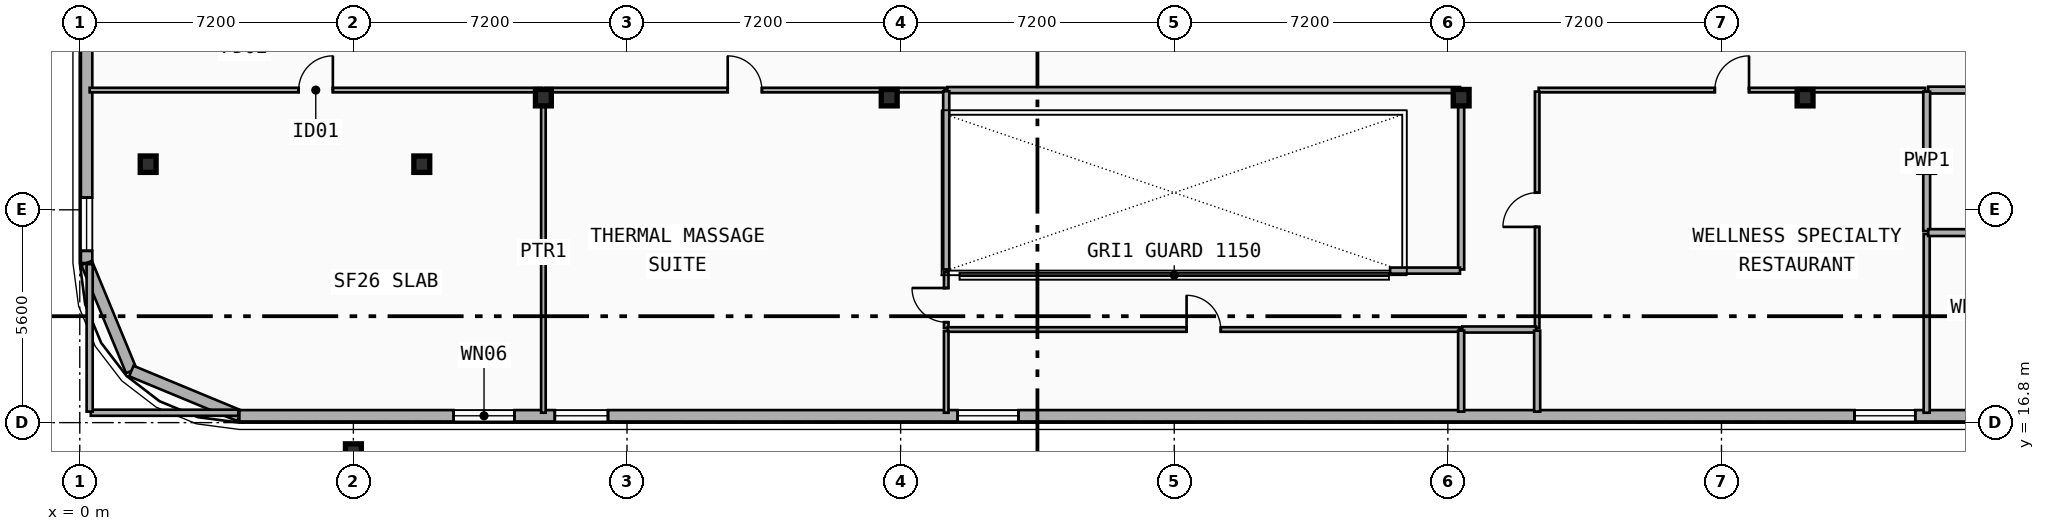
"""IFC4 building model, lengths in metres.
Left out: names, types, materials, properties, quantities, classifications, styles, units other than length and angle.
Written with IfcOpenShell. Run it as: python <this file> out.ifc"""

import sys

from ifc_helpers import new_model, si_unit, direction, frame, frame_2d, origin, origin_2d, place, context, subcontext, project, spatial, rectangle, i_section, extrude, element, fill, save


model = new_model("IFC4")
c1 = context("Model", 3, precision=1e-05, world=origin(), true_north=direction((0.0, 1.0)))
c2 = subcontext(c1, "Body", "Model", "MODEL_VIEW")
j1 = project(units=[si_unit("LENGTHUNIT", "METRE"), si_unit("PLANEANGLEUNIT", "RADIAN")], contexts=[c1])
p1 = place(None, origin())
s1 = spatial("IfcSite", under=j1, at=p1, CompositionType="ELEMENT")
p2 = place(p1, origin())
s2 = spatial("IfcBuilding", under=s1, at=p2, CompositionType="ELEMENT")
p3 = place(p2, frame((0.0, 0.0, 122.3)))
s3 = spatial("IfcBuildingStorey", under=s2, at=p3, CompositionType="ELEMENT", Elevation=122.3)
for number, where, z_axis, x_axis in (
    (1, (12.2, 25.35, 0.0), (0.0, 0.0, 1.0), (1.0, 0.0, 0.0)),
    (2, (21.3, 25.35, 0.0), (0.0, 0.0, 1.0), (1.0, 0.0, 0.0)),
    (3, (36.35, 25.35, 0.0), (0.0, 0.0, 1.0), (1.0, 0.0, 0.0)),
    (4, (45.4, 25.35, 0.0), (0.0, 0.0, 1.0), (1.0, 0.0, 0.0)),
    (5, (9.0, 23.6, 0.0), (0.0, 0.0, 1.0), (1.0, 0.0, 0.0)),
    (6, (48.6, 23.6, 0.0), (0.0, 0.0, 1.0), (1.0, 0.0, 0.0)),
    (7, (1.8, 23.6, 0.0), (0.0, 0.0, 1.0), (1.0, 0.0, 0.0)),
):
    element("IfcColumn", number, at=place(p3, frame(where, z_axis=z_axis, x_axis=x_axis)), inside=s3, PredefinedType="COLUMN", context=c2, shape_type="SweptSolid", body=[
        extrude(i_section(OverallWidth=0.418, OverallDepth=0.432, WebThickness=0.035, FlangeThickness=0.056, FilletRadius=0.015, at=origin_2d()), origin(), (0.0, 0.0, 1.0), 3.5),
    ])
p4 = place(p3, frame((7.2, 16.122, 0.0), z_axis=(0.0, -0.079891690793, 0.996803550226), x_axis=(1.0, 0.0, 0.0)))
e8 = element("IfcColumn", 8, at=p4, inside=s3, PredefinedType="COLUMN", context=c2, shape_type="SweptSolid", body=[
    extrude(i_section(OverallWidth=0.418, OverallDepth=0.432, WebThickness=0.035, FlangeThickness=0.056, FilletRadius=0.015, at=origin_2d()), origin(), (0.0, 0.0, 1.0), 3.511),
])
p5 = place(p3, frame((0.18, 21.0, 0.0), z_axis=(0.0, 0.0, 1.0), x_axis=(0.0, 1.0, 0.0)))
e9 = element("IfcWall", 9, at=p5, inside=s3, PredefinedType="SOLIDWALL", context=c2, shape_type="SweptSolid", body=[
    extrude(rectangle(XDim=18.0, YDim=0.3, at=frame_2d((9.0, 0.0))), origin(), (0.0, 0.0, 1.0), 3.24),
])
p6 = place(p5, frame((7.47, 0.0, 0.48)))
e10 = element("IfcOpeningElement", 10, at=p6, cuts=e9, PredefinedType="OPENING", context=c2, shape_type="SweptSolid", body=[
    extrude(rectangle(XDim=1.4, YDim=1.8, at=frame_2d((0.7, 0.9))), frame((0.0, 0.16, 0.0), z_axis=(0.0, -1.0, 0.0), x_axis=(1.0, 0.0, 0.0)), (0.0, 0.0, 1.0), 0.32),
])
p7 = place(p5, frame((12.509, 0.0, 0.48)))
e11 = element("IfcOpeningElement", 11, at=p7, cuts=e9, PredefinedType="OPENING", context=c2, shape_type="SweptSolid", body=[
    extrude(rectangle(XDim=1.4, YDim=1.8, at=frame_2d((0.7, 0.9))), frame((0.0, 0.16, 0.0), z_axis=(0.0, -1.0, 0.0), x_axis=(1.0, 0.0, 0.0)), (0.0, 0.0, 1.0), 0.32),
])
p8 = place(p5, frame((0.32, 0.0, 0.65)))
e12 = element("IfcOpeningElement", 12, at=p8, cuts=e9, PredefinedType="OPENING", context=c2, shape_type="SweptSolid", body=[
    extrude(rectangle(XDim=1.4, YDim=1.8, at=frame_2d((0.7, 0.9))), frame((0.0, 0.16, 0.0), z_axis=(0.0, -1.0, 0.0), x_axis=(1.0, 0.0, 0.0)), (0.0, 0.0, 1.0), 0.32),
])
for number, where, z_axis, x_axis in (
    (13, (1.357, 18.157, 0.0), (0.0, 0.0, 1.0), (-0.383, 0.924, 0.0)),
    (14, (4.2, 16.98, 0.0), (0.0, 0.0, 1.0), (-0.924, 0.383, 0.0)),
):
    element("IfcWall", number, at=place(p3, frame(where, z_axis=z_axis, x_axis=x_axis)), inside=s3, PredefinedType="SOLIDWALL", context=c2, shape_type="SweptSolid", body=[
        extrude(rectangle(XDim=3.077, YDim=0.3, at=frame_2d((1.538, 0.0))), origin(), (0.0, 0.0, 1.0), 3.24),
    ])
p9 = place(p3, frame((53.4, 16.98, 0.0), z_axis=(0.0, 0.0, 1.0), x_axis=(-1.0, 0.0, 0.0)))
e15 = element("IfcWall", 15, at=p9, inside=s3, PredefinedType="SOLIDWALL", context=c2, shape_type="SweptSolid", body=[
    extrude(rectangle(XDim=49.2, YDim=0.3, at=frame_2d((24.6, 0.0))), origin(), (0.0, 0.0, 1.0), 3.24),
])
p10 = place(p9, frame((41.962, 0.0, 0.8)))
e16 = element("IfcOpeningElement", 16, at=p10, cuts=e15, PredefinedType="OPENING", context=c2, shape_type="SweptSolid", body=[
    extrude(rectangle(XDim=1.6, YDim=1.95, at=frame_2d((0.8, 0.975))), frame((0.0, 0.16, 0.0), z_axis=(0.0, -1.0, 0.0), x_axis=(1.0, 0.0, 0.0)), (0.0, 0.0, 1.0), 0.32),
])
p11 = place(p9, frame((39.5, 0.0, 0.34)))
e17 = element("IfcOpeningElement", 17, at=p11, cuts=e15, PredefinedType="OPENING", context=c2, shape_type="SweptSolid", body=[
    extrude(rectangle(XDim=1.4, YDim=1.8, at=frame_2d((0.7, 0.9))), frame((0.0, 0.16, 0.0), z_axis=(0.0, -1.0, 0.0), x_axis=(1.0, 0.0, 0.0)), (0.0, 0.0, 1.0), 0.32),
])
p12 = place(p9, frame((28.7, 0.0, 0.65)))
e18 = element("IfcOpeningElement", 18, at=p12, cuts=e15, PredefinedType="OPENING", context=c2, shape_type="SweptSolid", body=[
    extrude(rectangle(XDim=1.6, YDim=1.95, at=frame_2d((0.8, 0.975))), frame((0.0, 0.16, 0.0), z_axis=(0.0, -1.0, 0.0), x_axis=(1.0, 0.0, 0.0)), (0.0, 0.0, 1.0), 0.32),
])
p13 = place(p9, frame((5.1, 0.0, 0.8)))
e19 = element("IfcOpeningElement", 19, at=p13, cuts=e15, PredefinedType="OPENING", context=c2, shape_type="SweptSolid", body=[
    extrude(rectangle(XDim=1.6, YDim=1.95, at=frame_2d((0.8, 0.975))), frame((0.0, 0.16, 0.0), z_axis=(0.0, -1.0, 0.0), x_axis=(1.0, 0.0, 0.0)), (0.0, 0.0, 1.0), 0.32),
])
p14 = place(p3, frame((0.26, 25.55, 0.0), z_axis=(0.0, 0.0, 1.0), x_axis=(1.0, 0.0, 0.0)))
e20 = element("IfcWall", 20, at=p14, inside=s3, PredefinedType="PARTITIONING", context=c2, shape_type="SweptSolid", body=[
    extrude(rectangle(XDim=11.9, YDim=0.12, at=frame_2d((5.95, 0.0))), origin(), (0.0, 0.0, 1.0), 2.406),
])
p15 = place(p14, frame((5.5, 0.0, 0.0)))
e21 = element("IfcOpeningElement", 21, at=p15, cuts=e20, PredefinedType="OPENING", context=c2, shape_type="SweptSolid", body=[
    extrude(rectangle(XDim=0.9, YDim=2.1, at=frame_2d((0.45, 1.05))), frame((0.0, 0.07, 0.0), z_axis=(0.0, -1.0, 0.0), x_axis=(1.0, 0.0, 0.0)), (0.0, 0.0, 1.0), 0.14),
])
p16 = place(p3, frame((12.24, 25.55, 0.0), z_axis=(0.0, 0.0, 1.0), x_axis=(1.0, 0.0, 0.0)))
e22 = element("IfcWall", 22, at=p16, inside=s3, PredefinedType="PARTITIONING", context=c2, shape_type="SweptSolid", body=[
    extrude(rectangle(XDim=10.52, YDim=0.12, at=frame_2d((5.26, 0.0))), origin(), (0.0, 0.0, 1.0), 2.406),
])
p17 = place(p16, frame((4.81, 0.0, 0.0)))
e23 = element("IfcOpeningElement", 23, at=p17, cuts=e22, PredefinedType="OPENING", context=c2, shape_type="SweptSolid", body=[
    extrude(rectangle(XDim=0.9, YDim=2.1, at=frame_2d((0.45, 1.05))), frame((0.0, 0.07, 0.0), z_axis=(0.0, -1.0, 0.0), x_axis=(1.0, 0.0, 0.0)), (0.0, 0.0, 1.0), 0.14),
])
p18 = place(p3, frame((38.39, 25.55, 0.0), z_axis=(0.0, 0.0, 1.0), x_axis=(1.0, 0.0, 0.0)))
e24 = element("IfcWall", 24, at=p18, inside=s3, PredefinedType="PARTITIONING", context=c2, shape_type="SweptSolid", body=[
    extrude(rectangle(XDim=10.17, YDim=0.12, at=frame_2d((5.085, 0.0))), origin(), (0.0, 0.0, 1.0), 2.406),
])
p19 = place(p18, frame((4.635, 0.0, 0.0)))
e25 = element("IfcOpeningElement", 25, at=p19, cuts=e24, PredefinedType="OPENING", context=c2, shape_type="SweptSolid", body=[
    extrude(rectangle(XDim=0.9, YDim=2.1, at=frame_2d((0.45, 1.05))), frame((0.0, 0.07, 0.0), z_axis=(0.0, -1.0, 0.0), x_axis=(1.0, 0.0, 0.0)), (0.0, 0.0, 1.0), 0.14),
])
p20 = place(p3, frame((48.64, 25.55, 0.0), z_axis=(0.0, 0.0, 1.0), x_axis=(1.0, 0.0, 0.0)))
e26 = element("IfcWall", 26, at=p20, inside=s3, PredefinedType="PLUMBINGWALL", context=c2, shape_type="SweptSolid", body=[
    extrude(rectangle(XDim=8.7, YDim=0.18, at=frame_2d((4.35, 0.0))), origin(), (0.0, 0.0, 1.0), 2.57),
])
p21 = place(p20, frame((3.85, 0.0, 0.0)))
e27 = element("IfcOpeningElement", 27, at=p21, cuts=e26, PredefinedType="OPENING", context=c2, shape_type="SweptSolid", body=[
    extrude(rectangle(XDim=1.0, YDim=2.15, at=frame_2d((0.5, 1.075))), frame((0.0, 0.1, 0.0), z_axis=(0.0, -1.0, 0.0), x_axis=(1.0, 0.0, 0.0)), (0.0, 0.0, 1.0), 0.2),
])
p22 = place(p3, frame((38.35, 19.29, 0.0), z_axis=(0.0, 0.0, 1.0), x_axis=(0.0, 1.0, 0.0)))
e28 = element("IfcWall", 28, at=p22, inside=s3, PredefinedType="PARTITIONING", context=c2, shape_type="SweptSolid", body=[
    extrude(rectangle(XDim=6.22, YDim=0.12, at=frame_2d((3.11, 0.0))), origin(), (0.0, 0.0, 1.0), 2.72),
])
p23 = place(p22, frame((2.66, 0.0, 0.0)))
e29 = element("IfcOpeningElement", 29, at=p23, cuts=e28, PredefinedType="OPENING", context=c2, shape_type="SweptSolid", body=[
    extrude(rectangle(XDim=0.9, YDim=2.1, at=frame_2d((0.45, 1.05))), frame((0.0, 0.07, 0.0), z_axis=(0.0, -1.0, 0.0), x_axis=(1.0, 0.0, 0.0)), (0.0, 0.0, 1.0), 0.14),
])
p24 = place(p3, frame((22.8, 19.29, 0.0), z_axis=(0.0, 0.0, 1.0), x_axis=(0.0, 1.0, 0.0)))
e30 = element("IfcWall", 30, at=p24, inside=s3, PredefinedType="PARTITIONING", context=c2, shape_type="SweptSolid", body=[
    extrude(rectangle(XDim=1.47, YDim=0.12, at=frame_2d((0.735, 0.0))), origin(), (0.0, 0.0, 1.0), 2.68),
])
p25 = place(p24, frame((0.152, 0.0, 0.0)))
e31 = element("IfcOpeningElement", 31, at=p25, cuts=e30, PredefinedType="OPENING", context=c2, shape_type="SweptSolid", body=[
    extrude(rectangle(XDim=0.9, YDim=2.1, at=frame_2d((0.45, 1.05))), frame((0.0, 0.07, 0.0), z_axis=(0.0, -1.0, 0.0), x_axis=(1.0, 0.0, 0.0)), (0.0, 0.0, 1.0), 0.14),
])
p26 = place(p3, frame((22.84, 19.25, 0.0), z_axis=(0.0, 0.0, 1.0), x_axis=(1.0, 0.0, 0.0)))
e32 = element("IfcWall", 32, at=p26, inside=s3, PredefinedType="PARTITIONING", context=c2, shape_type="SweptSolid", body=[
    extrude(rectangle(XDim=13.47, YDim=0.12, at=frame_2d((6.735, 0.0))), origin(), (0.0, 0.0, 1.0), 2.406),
])
p27 = place(p26, frame((6.285, 0.0, 0.0)))
e33 = element("IfcOpeningElement", 33, at=p27, cuts=e32, PredefinedType="OPENING", context=c2, shape_type="SweptSolid", body=[
    extrude(rectangle(XDim=0.9, YDim=2.1, at=frame_2d((0.45, 1.05))), frame((0.0, 0.07, 0.0), z_axis=(0.0, -1.0, 0.0), x_axis=(1.0, 0.0, 0.0)), (0.0, 0.0, 1.0), 0.14),
])
p28 = place(p3, frame((12.2, 17.06, 0.0), z_axis=(0.0, 0.0, 1.0), x_axis=(0.0, 1.0, 0.0)))
e34 = element("IfcWall", 34, at=p28, inside=s3, PredefinedType="PARTITIONING", context=c2, shape_type="SweptSolid", body=[
    extrude(rectangle(XDim=8.45, YDim=0.12, at=frame_2d((4.225, 0.0))), origin(), (0.0, 0.0, 1.0), 2.406),
])
p29 = place(p3, frame((22.8, 17.06, 0.0), z_axis=(0.0, 0.0, 1.0), x_axis=(0.0, 1.0, 0.0)))
e35 = element("IfcWall", 35, at=p29, inside=s3, PredefinedType="PARTITIONING", context=c2, shape_type="SweptSolid", body=[
    extrude(rectangle(XDim=2.15, YDim=0.12, at=frame_2d((1.075, 0.0))), origin(), (0.0, 0.0, 1.0), 2.92),
])
p30 = place(p3, frame((48.6, 21.84, 0.0), z_axis=(0.0, 0.0, 1.0), x_axis=(0.0, 1.0, 0.0)))
e36 = element("IfcWall", 36, at=p30, inside=s3, PredefinedType="PLUMBINGWALL", context=c2, shape_type="SweptSolid", body=[
    extrude(rectangle(XDim=3.67, YDim=0.18, at=frame_2d((1.835, 0.0))), origin(), (0.0, 0.0, 1.0), 2.72),
])
p31 = place(p3, frame((48.6, 17.06, 0.0), z_axis=(0.0, 0.0, 1.0), x_axis=(0.0, 1.0, 0.0)))
e37 = element("IfcWall", 37, at=p31, inside=s3, PredefinedType="PARTITIONING", context=c2, shape_type="SweptSolid", body=[
    extrude(rectangle(XDim=4.7, YDim=0.16, at=frame_2d((2.35, 0.0))), origin(), (0.0, 0.0, 1.0), 2.72),
])
p32 = place(p3, frame((48.64, 21.8, 0.0), z_axis=(0.0, 0.0, 1.0), x_axis=(1.0, 0.0, 0.0)))
e38 = element("IfcWall", 38, at=p32, inside=s3, PredefinedType="PLUMBINGWALL", context=c2, shape_type="SweptSolid", body=[
    extrude(rectangle(XDim=8.7, YDim=0.18, at=frame_2d((4.35, 0.0))), origin(), (0.0, 0.0, 1.0), 2.57),
])
p33 = place(p32, frame((3.85, 0.0, 0.0)))
e39 = element("IfcOpeningElement", 39, at=p33, cuts=e38, PredefinedType="OPENING", context=c2, shape_type="SweptSolid", body=[
    extrude(rectangle(XDim=1.0, YDim=2.15, at=frame_2d((0.5, 1.075))), frame((0.0, 0.1, 0.0), z_axis=(0.0, -1.0, 0.0), x_axis=(1.0, 0.0, 0.0)), (0.0, 0.0, 1.0), 0.2),
])
p34 = place(p3, frame((22.83, 25.55, 0.0), z_axis=(0.0, 0.0, 1.0), x_axis=(1.0, 0.0, 0.0)))
e40 = element("IfcWall", 40, at=p34, inside=s3, PredefinedType="PARTITIONING", context=c2, shape_type="SweptSolid", body=[
    extrude(rectangle(XDim=13.49, YDim=0.16, at=frame_2d((6.745, 0.0))), origin(), (0.0, 0.0, 1.0), 2.406),
])
p35 = place(p3, frame((36.38, 19.25, 0.0), z_axis=(0.0, 0.0, 1.0), x_axis=(1.0, 0.0, 0.0)))
e41 = element("IfcWall", 41, at=p35, inside=s3, PredefinedType="PARTITIONING", context=c2, shape_type="SweptSolid", body=[
    extrude(rectangle(XDim=1.94, YDim=0.16, at=frame_2d((0.97, 0.0))), origin(), (0.0, 0.0, 1.0), 2.406),
])
p36 = place(p3, frame((36.35, 20.83, 0.0), z_axis=(0.0, 0.0, 1.0), x_axis=(0.0, 1.0, 0.0)))
e42 = element("IfcWall", 42, at=p36, inside=s3, PredefinedType="PARTITIONING", context=c2, shape_type="SweptSolid", body=[
    extrude(rectangle(XDim=4.69, YDim=0.16, at=frame_2d((2.345, 0.0))), origin(), (0.0, 0.0, 1.0), 2.406),
])
p37 = place(p3, frame((34.48, 20.8, 0.0), z_axis=(0.0, 0.0, 1.0), x_axis=(1.0, 0.0, 0.0)))
e43 = element("IfcWall", 43, at=p37, inside=s3, PredefinedType="PARTITIONING", context=c2, shape_type="SweptSolid", body=[
    extrude(rectangle(XDim=1.84, YDim=0.16, at=frame_2d((0.92, 0.0))), origin(), (0.0, 0.0, 1.0), 2.406),
])
p38 = place(p3, frame((0.29, 17.06, 0.0), z_axis=(0.0, 0.0, 1.0), x_axis=(1.0, 0.0, 0.0)))
e44 = element("IfcWall", 44, at=p38, inside=s3, PredefinedType="PARTITIONING", context=c2, shape_type="SweptSolid", body=[
    extrude(rectangle(XDim=3.88, YDim=0.16, at=frame_2d((1.94, 0.0))), origin(), (0.0, 0.0, 1.0), 2.72),
])
p39 = place(p3, frame((0.26, 17.09, 0.0), z_axis=(0.0, 0.0, 1.0), x_axis=(0.0, 1.0, 0.0)))
e45 = element("IfcWall", 45, at=p39, inside=s3, PredefinedType="PARTITIONING", context=c2, shape_type="SweptSolid", body=[
    extrude(rectangle(XDim=3.88, YDim=0.16, at=frame_2d((1.94, 0.0))), origin(), (0.0, 0.0, 1.0), 3.24),
])
p40 = place(p3, frame((22.8, 20.83, 0.0), z_axis=(0.0, 0.0, 1.0), x_axis=(0.0, 1.0, 0.0)))
e46 = element("IfcWall", 46, at=p40, inside=s3, PredefinedType="PARTITIONING", context=c2, shape_type="SweptSolid", body=[
    extrude(rectangle(XDim=4.69, YDim=0.16, at=frame_2d((2.345, 0.0))), origin(), (0.0, 0.0, 1.0), 2.68),
])
p41 = place(p3, frame((36.35, 17.09, 0.0), z_axis=(0.0, 0.0, 1.0), x_axis=(0.0, 1.0, 0.0)))
e47 = element("IfcWall", 47, at=p41, inside=s3, PredefinedType="PARTITIONING", context=c2, shape_type="SweptSolid", body=[
    extrude(rectangle(XDim=2.13, YDim=0.16, at=frame_2d((1.065, 0.0))), origin(), (0.0, 0.0, 1.0), 2.406),
])
p42 = place(p3, frame((38.35, 17.09, 0.0), z_axis=(0.0, 0.0, 1.0), x_axis=(0.0, 1.0, 0.0)))
e48 = element("IfcWall", 48, at=p42, inside=s3, PredefinedType="PARTITIONING", context=c2, shape_type="SweptSolid", body=[
    extrude(rectangle(XDim=2.13, YDim=0.16, at=frame_2d((1.065, 0.0))), origin(), (0.0, 0.0, 1.0), 2.72),
])
p43 = place(p8, origin())
e49 = element("IfcWindow", 49, at=p43, inside=s3, PartitioningType="SINGLE_PANEL", PredefinedType="WINDOW", context=c2, shape_type="SweptSolid", body=[
    extrude(rectangle(XDim=1.4, YDim=1.8, at=frame_2d((0.7, 0.9))), frame((0.0, 0.03, 0.0), z_axis=(0.0, -1.0, 0.0), x_axis=(1.0, 0.0, 0.0)), (0.0, 0.0, 1.0), 0.06),
])
fill(e12, e49)
p44 = place(p10, origin())
e50 = element("IfcWindow", 50, at=p44, inside=s3, PartitioningType="SINGLE_PANEL", PredefinedType="WINDOW", context=c2, shape_type="SweptSolid", body=[
    extrude(rectangle(XDim=1.6, YDim=1.95, at=frame_2d((0.8, 0.975))), frame((0.0, 0.03, 0.0), z_axis=(0.0, -1.0, 0.0), x_axis=(1.0, 0.0, 0.0)), (0.0, 0.0, 1.0), 0.06),
])
fill(e16, e50)
p45 = place(p11, origin())
e51 = element("IfcWindow", 51, at=p45, inside=s3, PartitioningType="SINGLE_PANEL", PredefinedType="WINDOW", context=c2, shape_type="SweptSolid", body=[
    extrude(rectangle(XDim=1.4, YDim=1.8, at=frame_2d((0.7, 0.9))), frame((0.0, 0.03, 0.0), z_axis=(0.0, -1.0, 0.0), x_axis=(1.0, 0.0, 0.0)), (0.0, 0.0, 1.0), 0.06),
])
fill(e17, e51)
p46 = place(p12, origin())
e52 = element("IfcWindow", 52, at=p46, inside=s3, PartitioningType="SINGLE_PANEL", PredefinedType="WINDOW", context=c2, shape_type="SweptSolid", body=[
    extrude(rectangle(XDim=1.6, YDim=1.95, at=frame_2d((0.8, 0.975))), frame((0.0, 0.03, 0.0), z_axis=(0.0, -1.0, 0.0), x_axis=(1.0, 0.0, 0.0)), (0.0, 0.0, 1.0), 0.06),
])
fill(e18, e52)
p47 = place(p13, origin())
e53 = element("IfcWindow", 53, at=p47, inside=s3, PartitioningType="SINGLE_PANEL", PredefinedType="WINDOW", context=c2, shape_type="SweptSolid", body=[
    extrude(rectangle(XDim=1.6, YDim=1.95, at=frame_2d((0.8, 0.975))), frame((0.0, 0.03, 0.0), z_axis=(0.0, -1.0, 0.0), x_axis=(1.0, 0.0, 0.0)), (0.0, 0.0, 1.0), 0.06),
])
fill(e19, e53)
p48 = place(p15, origin())
e54 = element("IfcDoor", 54, at=p48, inside=s3, OperationType="SINGLE_SWING_RIGHT", PredefinedType="DOOR", context=c2, shape_type="SweptSolid", body=[
    extrude(rectangle(XDim=0.9, YDim=2.1, at=frame_2d((0.45, 1.05))), frame((0.0, 0.025, 0.0), z_axis=(0.0, -1.0, 0.0), x_axis=(1.0, 0.0, 0.0)), (0.0, 0.0, 1.0), 0.05),
])
fill(e21, e54)
p49 = place(p17, origin())
e55 = element("IfcDoor", 55, at=p49, inside=s3, OperationType="SINGLE_SWING_LEFT", PredefinedType="DOOR", context=c2, shape_type="SweptSolid", body=[
    extrude(rectangle(XDim=0.9, YDim=2.1, at=frame_2d((0.45, 1.05))), frame((0.0, 0.025, 0.0), z_axis=(0.0, -1.0, 0.0), x_axis=(1.0, 0.0, 0.0)), (0.0, 0.0, 1.0), 0.05),
])
fill(e23, e55)
p50 = place(p19, origin())
e56 = element("IfcDoor", 56, at=p50, inside=s3, OperationType="SINGLE_SWING_RIGHT", PredefinedType="DOOR", context=c2, shape_type="SweptSolid", body=[
    extrude(rectangle(XDim=0.9, YDim=2.1, at=frame_2d((0.45, 1.05))), frame((0.0, 0.025, 0.0), z_axis=(0.0, -1.0, 0.0), x_axis=(1.0, 0.0, 0.0)), (0.0, 0.0, 1.0), 0.05),
])
fill(e25, e56)
p51 = place(p23, origin())
e57 = element("IfcDoor", 57, at=p51, inside=s3, OperationType="SINGLE_SWING_LEFT", PredefinedType="DOOR", context=c2, shape_type="SweptSolid", body=[
    extrude(rectangle(XDim=0.9, YDim=2.1, at=frame_2d((0.45, 1.05))), frame((0.0, 0.025, 0.0), z_axis=(0.0, -1.0, 0.0), x_axis=(1.0, 0.0, 0.0)), (0.0, 0.0, 1.0), 0.05),
])
fill(e29, e57)
p52 = place(p25, origin())
e58 = element("IfcDoor", 58, at=p52, inside=s3, OperationType="SINGLE_SWING_RIGHT", PredefinedType="DOOR", context=c2, shape_type="SweptSolid", body=[
    extrude(rectangle(XDim=0.9, YDim=2.1, at=frame_2d((0.45, 1.05))), frame((0.0, 0.025, 0.0), z_axis=(0.0, -1.0, 0.0), x_axis=(1.0, 0.0, 0.0)), (0.0, 0.0, 1.0), 0.05),
])
fill(e31, e58)
p53 = place(p27, origin())
e59 = element("IfcDoor", 59, at=p53, inside=s3, OperationType="SINGLE_SWING_LEFT", PredefinedType="DOOR", context=c2, shape_type="SweptSolid", body=[
    extrude(rectangle(XDim=0.9, YDim=2.1, at=frame_2d((0.45, 1.05))), frame((0.0, 0.025, 0.0), z_axis=(0.0, -1.0, 0.0), x_axis=(1.0, 0.0, 0.0)), (0.0, 0.0, 1.0), 0.05),
])
fill(e33, e59)
save(model, sys.argv[1])
